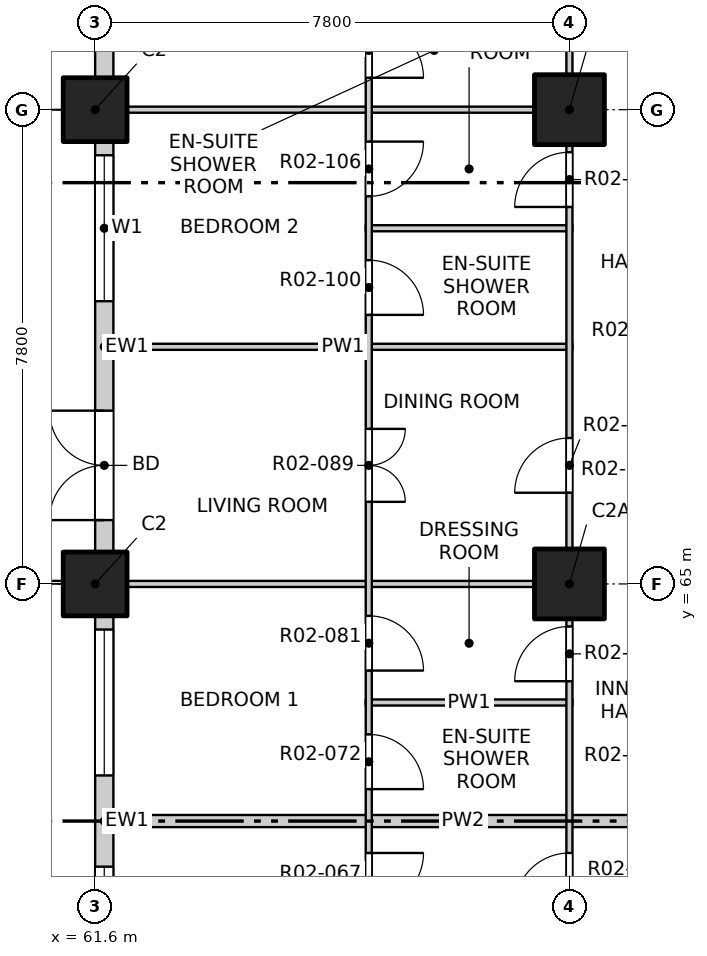
"""IFC4 building model, lengths in metres.
Left out: names, types, materials, properties, quantities, classifications, styles, units other than length and angle.
Written with IfcOpenShell. Run it as: python <this file> out.ifc"""

import sys

from ifc_helpers import new_model, si_unit, direction, frame, frame_2d, origin, origin_2d, place, context, subcontext, project, spatial, rectangle, extrude, element, fill, save


model = new_model("IFC4")
c1 = context("Model", 3, precision=1e-05, world=origin(), true_north=direction((0.0, 1.0)))
c2 = subcontext(c1, "Body", "Model", "MODEL_VIEW")
j1 = project(units=[si_unit("LENGTHUNIT", "METRE"), si_unit("PLANEANGLEUNIT", "RADIAN")], contexts=[c1])
p1 = place(None, origin())
s1 = spatial("IfcSite", under=j1, at=p1, CompositionType="ELEMENT")
p2 = place(p1, origin())
s2 = spatial("IfcBuilding", under=s1, at=p2, CompositionType="ELEMENT")
p3 = place(p2, frame((0.0, 0.0, 29.7)))
s3 = spatial("IfcBuildingStorey", under=s2, at=p3, CompositionType="ELEMENT", Elevation=29.7)
for number, where, z_axis, x_axis in (
    (1, (61.6, 65.0, -0.25), (0.0, 0.0, 1.0), (1.0, 0.0, 0.0)),
    (2, (61.6, 72.8, -0.25), (0.0, 0.0, 1.0), (1.0, 0.0, 0.0)),
):
    element("IfcColumn", number, at=place(p3, frame(where, z_axis=z_axis, x_axis=x_axis)), inside=s3, PredefinedType="COLUMN", context=c2, shape_type="SweptSolid", body=[
        extrude(rectangle(XDim=1.05, YDim=1.05, at=origin_2d()), origin(), (0.0, 0.0, 1.0), 3.4),
    ])
for number, where, z_axis, x_axis in (
    (3, (69.4, 65.0, -0.25), (0.0, 0.0, 1.0), (1.0, 0.0, 0.0)),
    (4, (69.4, 72.8, -0.25), (0.0, 0.0, 1.0), (1.0, 0.0, 0.0)),
):
    element("IfcColumn", number, at=place(p3, frame(where, z_axis=z_axis, x_axis=x_axis)), inside=s3, PredefinedType="COLUMN", context=c2, shape_type="SweptSolid", body=[
        extrude(rectangle(XDim=1.15, YDim=1.15, at=origin_2d()), origin(), (0.0, 0.0, 1.0), 3.4),
    ])
p4 = place(p3, frame((61.75, 57.725, 0.0), z_axis=(0.0, 0.0, 1.0), x_axis=(0.0, 1.0, 0.0)))
e5 = element("IfcWall", 5, at=p4, inside=s3, PredefinedType="SOLIDWALL", context=c2, shape_type="SweptSolid", body=[
    extrude(rectangle(XDim=6.75, YDim=0.3, at=frame_2d((3.375, 0.0))), origin(), (0.0, 0.0, 1.0), 2.7),
])
p5 = place(p4, frame((0.225, 0.0, 0.9)))
e6 = element("IfcOpeningElement", 6, at=p5, cuts=e5, PredefinedType="OPENING", context=c2, shape_type="SweptSolid", body=[
    extrude(rectangle(XDim=2.4, YDim=1.8, at=frame_2d((1.2, 0.9))), frame((0.0, 0.16, 0.0), z_axis=(0.0, -1.0, 0.0), x_axis=(1.0, 0.0, 0.0)), (0.0, 0.0, 1.0), 0.32),
])
p6 = place(p4, frame((4.125, 0.0, 0.9)))
e7 = element("IfcOpeningElement", 7, at=p6, cuts=e5, PredefinedType="OPENING", context=c2, shape_type="SweptSolid", body=[
    extrude(rectangle(XDim=2.4, YDim=1.8, at=frame_2d((1.2, 0.9))), frame((0.0, 0.16, 0.0), z_axis=(0.0, -1.0, 0.0), x_axis=(1.0, 0.0, 0.0)), (0.0, 0.0, 1.0), 0.32),
])
p7 = place(p3, frame((61.75, 65.525, 0.0), z_axis=(0.0, 0.0, 1.0), x_axis=(0.0, 1.0, 0.0)))
e8 = element("IfcWall", 8, at=p7, inside=s3, PredefinedType="SOLIDWALL", context=c2, shape_type="SweptSolid", body=[
    extrude(rectangle(XDim=6.75, YDim=0.3, at=frame_2d((3.375, 0.0))), origin(), (0.0, 0.0, 1.0), 2.7),
])
p8 = place(p7, frame((0.525, 0.0, 0.0)))
e9 = element("IfcOpeningElement", 9, at=p8, cuts=e8, PredefinedType="OPENING", context=c2, shape_type="SweptSolid", body=[
    extrude(rectangle(XDim=1.8, YDim=2.4, at=frame_2d((0.9, 1.2))), frame((0.0, 0.16, 0.0), z_axis=(0.0, -1.0, 0.0), x_axis=(1.0, 0.0, 0.0)), (0.0, 0.0, 1.0), 0.32),
])
p9 = place(p7, frame((4.125, 0.0, 0.9)))
e10 = element("IfcOpeningElement", 10, at=p9, cuts=e8, PredefinedType="OPENING", context=c2, shape_type="SweptSolid", body=[
    extrude(rectangle(XDim=2.4, YDim=1.8, at=frame_2d((1.2, 0.9))), frame((0.0, 0.16, 0.0), z_axis=(0.0, -1.0, 0.0), x_axis=(1.0, 0.0, 0.0)), (0.0, 0.0, 1.0), 0.32),
])
p10 = place(p3, frame((61.75, 73.325, 0.0), z_axis=(0.0, 0.0, 1.0), x_axis=(0.0, 1.0, 0.0)))
e11 = element("IfcWall", 11, at=p10, inside=s3, PredefinedType="SOLIDWALL", context=c2, shape_type="SweptSolid", body=[
    extrude(rectangle(XDim=6.75, YDim=0.3, at=frame_2d((3.375, 0.0))), origin(), (0.0, 0.0, 1.0), 2.7),
])
p11 = place(p10, frame((0.525, 0.0, 0.0)))
e12 = element("IfcOpeningElement", 12, at=p11, cuts=e11, PredefinedType="OPENING", context=c2, shape_type="SweptSolid", body=[
    extrude(rectangle(XDim=1.8, YDim=2.4, at=frame_2d((0.9, 1.2))), frame((0.0, 0.16, 0.0), z_axis=(0.0, -1.0, 0.0), x_axis=(1.0, 0.0, 0.0)), (0.0, 0.0, 1.0), 0.32),
])
p12 = place(p10, frame((4.125, 0.0, 0.9)))
e13 = element("IfcOpeningElement", 13, at=p12, cuts=e11, PredefinedType="OPENING", context=c2, shape_type="SweptSolid", body=[
    extrude(rectangle(XDim=2.4, YDim=1.8, at=frame_2d((1.2, 0.9))), frame((0.0, 0.16, 0.0), z_axis=(0.0, -1.0, 0.0), x_axis=(1.0, 0.0, 0.0)), (0.0, 0.0, 1.0), 0.32),
])
p13 = place(p3, frame((61.9, 61.1, 0.0), z_axis=(0.0, 0.0, 1.0), x_axis=(1.0, 0.0, 0.0)))
e14 = element("IfcWall", 14, at=p13, inside=s3, PredefinedType="PARTITIONING", context=c2, shape_type="SweptSolid", body=[
    extrude(rectangle(XDim=11.5, YDim=0.2, at=frame_2d((5.75, 0.0))), origin(), (0.0, 0.0, 1.0), 3.15),
])
p14 = place(p3, frame((66.05, 63.05, 0.0), z_axis=(0.0, 0.0, 1.0), x_axis=(1.0, 0.0, 0.0)))
e15 = element("IfcWall", 15, at=p14, inside=s3, PredefinedType="PARTITIONING", context=c2, shape_type="SweptSolid", body=[
    extrude(rectangle(XDim=3.4, YDim=0.1, at=frame_2d((1.7, 0.0))), origin(), (0.0, 0.0, 1.0), 3.15),
])
p15 = place(p3, frame((61.9, 65.0, 0.0), z_axis=(0.0, 0.0, 1.0), x_axis=(1.0, 0.0, 0.0)))
e16 = element("IfcWall", 16, at=p15, inside=s3, PredefinedType="PARTITIONING", context=c2, shape_type="SweptSolid", body=[
    extrude(rectangle(XDim=7.55, YDim=0.1, at=frame_2d((3.775, 0.0))), origin(), (0.0, 0.0, 1.0), 2.55),
])
p16 = place(p3, frame((61.9, 68.9, 0.0), z_axis=(0.0, 0.0, 1.0), x_axis=(1.0, 0.0, 0.0)))
e17 = element("IfcWall", 17, at=p16, inside=s3, PredefinedType="PARTITIONING", context=c2, shape_type="SweptSolid", body=[
    extrude(rectangle(XDim=7.55, YDim=0.1, at=frame_2d((3.775, 0.0))), origin(), (0.0, 0.0, 1.0), 3.15),
])
p17 = place(p3, frame((66.05, 70.85, 0.0), z_axis=(0.0, 0.0, 1.0), x_axis=(1.0, 0.0, 0.0)))
e18 = element("IfcWall", 18, at=p17, inside=s3, PredefinedType="PARTITIONING", context=c2, shape_type="SweptSolid", body=[
    extrude(rectangle(XDim=3.4, YDim=0.1, at=frame_2d((1.7, 0.0))), origin(), (0.0, 0.0, 1.0), 3.15),
])
p18 = place(p3, frame((61.9, 72.8, 0.0), z_axis=(0.0, 0.0, 1.0), x_axis=(1.0, 0.0, 0.0)))
e19 = element("IfcWall", 19, at=p18, inside=s3, PredefinedType="PARTITIONING", context=c2, shape_type="SweptSolid", body=[
    extrude(rectangle(XDim=7.55, YDim=0.1, at=frame_2d((3.775, 0.0))), origin(), (0.0, 0.0, 1.0), 2.55),
])
p19 = place(p3, frame((66.1, 41.9, 0.0), z_axis=(0.0, 0.0, 1.0), x_axis=(0.0, 1.0, 0.0)))
e20 = element("IfcWall", 20, at=p19, inside=s3, PredefinedType="PARTITIONING", context=c2, shape_type="SweptSolid", body=[
    extrude(rectangle(XDim=34.7, YDim=0.1, at=frame_2d((17.35, 0.0))), origin(), (0.0, 0.0, 1.0), 3.15),
])
p20 = place(p19, frame((1.05, 0.0, 0.0)))
e21 = element("IfcOpeningElement", 21, at=p20, cuts=e20, PredefinedType="OPENING", context=c2, shape_type="SweptSolid", body=[
    extrude(rectangle(XDim=1.2, YDim=2.1, at=frame_2d((0.6, 1.05))), frame((0.0, 0.06, 0.0), z_axis=(0.0, -1.0, 0.0), x_axis=(1.0, 0.0, 0.0)), (0.0, 0.0, 1.0), 0.12),
])
p21 = place(p19, frame((4.95, 0.0, 0.0)))
e22 = element("IfcOpeningElement", 22, at=p21, cuts=e20, PredefinedType="OPENING", context=c2, shape_type="SweptSolid", body=[
    extrude(rectangle(XDim=1.2, YDim=2.1, at=frame_2d((0.6, 1.05))), frame((0.0, 0.06, 0.0), z_axis=(0.0, -1.0, 0.0), x_axis=(1.0, 0.0, 0.0)), (0.0, 0.0, 1.0), 0.12),
])
p22 = place(p19, frame((8.025, 0.0, 0.0)))
e23 = element("IfcOpeningElement", 23, at=p22, cuts=e20, PredefinedType="OPENING", context=c2, shape_type="SweptSolid", body=[
    extrude(rectangle(XDim=0.9, YDim=2.1, at=frame_2d((0.45, 1.05))), frame((0.0, 0.06, 0.0), z_axis=(0.0, -1.0, 0.0), x_axis=(1.0, 0.0, 0.0)), (0.0, 0.0, 1.0), 0.12),
])
p23 = place(p19, frame((9.975, 0.0, 0.0)))
e24 = element("IfcOpeningElement", 24, at=p23, cuts=e20, PredefinedType="OPENING", context=c2, shape_type="SweptSolid", body=[
    extrude(rectangle(XDim=0.9, YDim=2.1, at=frame_2d((0.45, 1.05))), frame((0.0, 0.06, 0.0), z_axis=(0.0, -1.0, 0.0), x_axis=(1.0, 0.0, 0.0)), (0.0, 0.0, 1.0), 0.12),
])
p24 = place(p19, frame((12.75, 0.0, 0.0)))
e25 = element("IfcOpeningElement", 25, at=p24, cuts=e20, PredefinedType="OPENING", context=c2, shape_type="SweptSolid", body=[
    extrude(rectangle(XDim=1.2, YDim=2.1, at=frame_2d((0.6, 1.05))), frame((0.0, 0.06, 0.0), z_axis=(0.0, -1.0, 0.0), x_axis=(1.0, 0.0, 0.0)), (0.0, 0.0, 1.0), 0.12),
])
p25 = place(p19, frame((15.825, 0.0, 0.0)))
e26 = element("IfcOpeningElement", 26, at=p25, cuts=e20, PredefinedType="OPENING", context=c2, shape_type="SweptSolid", body=[
    extrude(rectangle(XDim=0.9, YDim=2.1, at=frame_2d((0.45, 1.05))), frame((0.0, 0.06, 0.0), z_axis=(0.0, -1.0, 0.0), x_axis=(1.0, 0.0, 0.0)), (0.0, 0.0, 1.0), 0.12),
])
p26 = place(p19, frame((17.775, 0.0, 0.0)))
e27 = element("IfcOpeningElement", 27, at=p26, cuts=e20, PredefinedType="OPENING", context=c2, shape_type="SweptSolid", body=[
    extrude(rectangle(XDim=0.9, YDim=2.1, at=frame_2d((0.45, 1.05))), frame((0.0, 0.06, 0.0), z_axis=(0.0, -1.0, 0.0), x_axis=(1.0, 0.0, 0.0)), (0.0, 0.0, 1.0), 0.12),
])
p27 = place(p19, frame((19.725, 0.0, 0.0)))
e28 = element("IfcOpeningElement", 28, at=p27, cuts=e20, PredefinedType="OPENING", context=c2, shape_type="SweptSolid", body=[
    extrude(rectangle(XDim=0.9, YDim=2.1, at=frame_2d((0.45, 1.05))), frame((0.0, 0.06, 0.0), z_axis=(0.0, -1.0, 0.0), x_axis=(1.0, 0.0, 0.0)), (0.0, 0.0, 1.0), 0.12),
])
p28 = place(p19, frame((21.675, 0.0, 0.0)))
e29 = element("IfcOpeningElement", 29, at=p28, cuts=e20, PredefinedType="OPENING", context=c2, shape_type="SweptSolid", body=[
    extrude(rectangle(XDim=0.9, YDim=2.1, at=frame_2d((0.45, 1.05))), frame((0.0, 0.06, 0.0), z_axis=(0.0, -1.0, 0.0), x_axis=(1.0, 0.0, 0.0)), (0.0, 0.0, 1.0), 0.12),
])
p29 = place(p19, frame((24.45, 0.0, 0.0)))
e30 = element("IfcOpeningElement", 30, at=p29, cuts=e20, PredefinedType="OPENING", context=c2, shape_type="SweptSolid", body=[
    extrude(rectangle(XDim=1.2, YDim=2.1, at=frame_2d((0.6, 1.05))), frame((0.0, 0.06, 0.0), z_axis=(0.0, -1.0, 0.0), x_axis=(1.0, 0.0, 0.0)), (0.0, 0.0, 1.0), 0.12),
])
p30 = place(p19, frame((27.525, 0.0, 0.0)))
e31 = element("IfcOpeningElement", 31, at=p30, cuts=e20, PredefinedType="OPENING", context=c2, shape_type="SweptSolid", body=[
    extrude(rectangle(XDim=0.9, YDim=2.1, at=frame_2d((0.45, 1.05))), frame((0.0, 0.06, 0.0), z_axis=(0.0, -1.0, 0.0), x_axis=(1.0, 0.0, 0.0)), (0.0, 0.0, 1.0), 0.12),
])
p31 = place(p19, frame((29.475, 0.0, 0.0)))
e32 = element("IfcOpeningElement", 32, at=p31, cuts=e20, PredefinedType="OPENING", context=c2, shape_type="SweptSolid", body=[
    extrude(rectangle(XDim=0.9, YDim=2.1, at=frame_2d((0.45, 1.05))), frame((0.0, 0.06, 0.0), z_axis=(0.0, -1.0, 0.0), x_axis=(1.0, 0.0, 0.0)), (0.0, 0.0, 1.0), 0.12),
])
p32 = place(p19, frame((31.425, 0.0, 0.0)))
e33 = element("IfcOpeningElement", 33, at=p32, cuts=e20, PredefinedType="OPENING", context=c2, shape_type="SweptSolid", body=[
    extrude(rectangle(XDim=0.9, YDim=2.1, at=frame_2d((0.45, 1.05))), frame((0.0, 0.06, 0.0), z_axis=(0.0, -1.0, 0.0), x_axis=(1.0, 0.0, 0.0)), (0.0, 0.0, 1.0), 0.12),
])
p33 = place(p19, frame((33.375, 0.0, 0.0)))
e34 = element("IfcOpeningElement", 34, at=p33, cuts=e20, PredefinedType="OPENING", context=c2, shape_type="SweptSolid", body=[
    extrude(rectangle(XDim=0.9, YDim=2.1, at=frame_2d((0.45, 1.05))), frame((0.0, 0.06, 0.0), z_axis=(0.0, -1.0, 0.0), x_axis=(1.0, 0.0, 0.0)), (0.0, 0.0, 1.0), 0.12),
])
p34 = place(p3, frame((69.4, 49.4, 0.0), z_axis=(0.0, 0.0, 1.0), x_axis=(0.0, 1.0, 0.0)))
e35 = element("IfcWall", 35, at=p34, inside=s3, PredefinedType="PARTITIONING", context=c2, shape_type="SweptSolid", body=[
    extrude(rectangle(XDim=31.2, YDim=0.1, at=frame_2d((15.6, 0.0))), origin(), (0.0, 0.0, 1.0), 3.15),
])
p35 = place(p34, frame((2.475, 0.0, 0.0)))
e36 = element("IfcOpeningElement", 36, at=p35, cuts=e35, PredefinedType="OPENING", context=c2, shape_type="SweptSolid", body=[
    extrude(rectangle(XDim=0.9, YDim=2.1, at=frame_2d((0.45, 1.05))), frame((0.0, 0.06, 0.0), z_axis=(0.0, -1.0, 0.0), x_axis=(1.0, 0.0, 0.0)), (0.0, 0.0, 1.0), 0.12),
])
p36 = place(p34, frame((5.4, 0.0, 0.0)))
e37 = element("IfcOpeningElement", 37, at=p36, cuts=e35, PredefinedType="OPENING", context=c2, shape_type="SweptSolid", body=[
    extrude(rectangle(XDim=0.9, YDim=2.1, at=frame_2d((0.45, 1.05))), frame((0.0, 0.06, 0.0), z_axis=(0.0, -1.0, 0.0), x_axis=(1.0, 0.0, 0.0)), (0.0, 0.0, 1.0), 0.12),
])
p37 = place(p34, frame((10.275, 0.0, 0.0)))
e38 = element("IfcOpeningElement", 38, at=p37, cuts=e35, PredefinedType="OPENING", context=c2, shape_type="SweptSolid", body=[
    extrude(rectangle(XDim=0.9, YDim=2.1, at=frame_2d((0.45, 1.05))), frame((0.0, 0.06, 0.0), z_axis=(0.0, -1.0, 0.0), x_axis=(1.0, 0.0, 0.0)), (0.0, 0.0, 1.0), 0.12),
])
p38 = place(p34, frame((14.0, 0.0, 0.0)))
e39 = element("IfcOpeningElement", 39, at=p38, cuts=e35, PredefinedType="OPENING", context=c2, shape_type="SweptSolid", body=[
    extrude(rectangle(XDim=0.9, YDim=2.1, at=frame_2d((0.45, 1.05))), frame((0.0, 0.06, 0.0), z_axis=(0.0, -1.0, 0.0), x_axis=(1.0, 0.0, 0.0)), (0.0, 0.0, 1.0), 0.12),
])
p39 = place(p34, frame((17.1, 0.0, 0.0)))
e40 = element("IfcOpeningElement", 40, at=p39, cuts=e35, PredefinedType="OPENING", context=c2, shape_type="SweptSolid", body=[
    extrude(rectangle(XDim=0.9, YDim=2.1, at=frame_2d((0.45, 1.05))), frame((0.0, 0.06, 0.0), z_axis=(0.0, -1.0, 0.0), x_axis=(1.0, 0.0, 0.0)), (0.0, 0.0, 1.0), 0.12),
])
p40 = place(p34, frame((21.8, 0.0, 0.0)))
e41 = element("IfcOpeningElement", 41, at=p40, cuts=e35, PredefinedType="OPENING", context=c2, shape_type="SweptSolid", body=[
    extrude(rectangle(XDim=0.9, YDim=2.1, at=frame_2d((0.45, 1.05))), frame((0.0, 0.06, 0.0), z_axis=(0.0, -1.0, 0.0), x_axis=(1.0, 0.0, 0.0)), (0.0, 0.0, 1.0), 0.12),
])
p41 = place(p34, frame((25.875, 0.0, 0.0)))
e42 = element("IfcOpeningElement", 42, at=p41, cuts=e35, PredefinedType="OPENING", context=c2, shape_type="SweptSolid", body=[
    extrude(rectangle(XDim=0.9, YDim=2.1, at=frame_2d((0.45, 1.05))), frame((0.0, 0.06, 0.0), z_axis=(0.0, -1.0, 0.0), x_axis=(1.0, 0.0, 0.0)), (0.0, 0.0, 1.0), 0.12),
])
p42 = place(p34, frame((29.6, 0.0, 0.0)))
e43 = element("IfcOpeningElement", 43, at=p42, cuts=e35, PredefinedType="OPENING", context=c2, shape_type="SweptSolid", body=[
    extrude(rectangle(XDim=0.9, YDim=2.1, at=frame_2d((0.45, 1.05))), frame((0.0, 0.06, 0.0), z_axis=(0.0, -1.0, 0.0), x_axis=(1.0, 0.0, 0.0)), (0.0, 0.0, 1.0), 0.12),
])
p43 = place(p5, origin())
e44 = element("IfcWindow", 44, at=p43, inside=s3, PartitioningType="DOUBLE_PANEL_VERTICAL", PredefinedType="WINDOW", context=c2, shape_type="SweptSolid", body=[
    extrude(rectangle(XDim=2.4, YDim=1.8, at=frame_2d((1.2, 0.9))), frame((0.0, 0.03, 0.0), z_axis=(0.0, -1.0, 0.0), x_axis=(1.0, 0.0, 0.0)), (0.0, 0.0, 1.0), 0.06),
])
fill(e6, e44)
p44 = place(p6, origin())
e45 = element("IfcWindow", 45, at=p44, inside=s3, PartitioningType="DOUBLE_PANEL_VERTICAL", PredefinedType="WINDOW", context=c2, shape_type="SweptSolid", body=[
    extrude(rectangle(XDim=2.4, YDim=1.8, at=frame_2d((1.2, 0.9))), frame((0.0, 0.03, 0.0), z_axis=(0.0, -1.0, 0.0), x_axis=(1.0, 0.0, 0.0)), (0.0, 0.0, 1.0), 0.06),
])
fill(e7, e45)
p45 = place(p8, origin())
e46 = element("IfcDoor", 46, at=p45, inside=s3, OperationType="DOUBLE_DOOR_SINGLE_SWING", PredefinedType="DOOR", context=c2, shape_type="SweptSolid", body=[
    extrude(rectangle(XDim=1.8, YDim=2.4, at=frame_2d((0.9, 1.2))), frame((0.0, 0.025, 0.0), z_axis=(0.0, -1.0, 0.0), x_axis=(1.0, 0.0, 0.0)), (0.0, 0.0, 1.0), 0.05),
])
fill(e9, e46)
p46 = place(p9, origin())
e47 = element("IfcWindow", 47, at=p46, inside=s3, PartitioningType="DOUBLE_PANEL_VERTICAL", PredefinedType="WINDOW", context=c2, shape_type="SweptSolid", body=[
    extrude(rectangle(XDim=2.4, YDim=1.8, at=frame_2d((1.2, 0.9))), frame((0.0, 0.03, 0.0), z_axis=(0.0, -1.0, 0.0), x_axis=(1.0, 0.0, 0.0)), (0.0, 0.0, 1.0), 0.06),
])
fill(e10, e47)
p47 = place(p26, origin())
e48 = element("IfcDoor", 48, at=p47, inside=s3, OperationType="SINGLE_SWING_LEFT", PredefinedType="DOOR", context=c2, shape_type="SweptSolid", body=[
    extrude(rectangle(XDim=0.9, YDim=2.1, at=frame_2d((0.45, 1.05))), frame((0.0, 0.025, 0.0), z_axis=(0.0, -1.0, 0.0), x_axis=(1.0, 0.0, 0.0)), (0.0, 0.0, 1.0), 0.05),
])
fill(e27, e48)
p48 = place(p37, origin())
e49 = element("IfcDoor", 49, at=p48, inside=s3, OperationType="SINGLE_SWING_LEFT", PredefinedType="DOOR", context=c2, shape_type="SweptSolid", body=[
    extrude(rectangle(XDim=0.9, YDim=2.1, at=frame_2d((0.45, 1.05))), frame((0.0, 0.025, 0.0), z_axis=(0.0, -1.0, 0.0), x_axis=(1.0, 0.0, 0.0)), (0.0, 0.0, 1.0), 0.05),
])
fill(e38, e49)
p49 = place(p27, origin())
e50 = element("IfcDoor", 50, at=p49, inside=s3, OperationType="SINGLE_SWING_RIGHT", PredefinedType="DOOR", context=c2, shape_type="SweptSolid", body=[
    extrude(rectangle(XDim=0.9, YDim=2.1, at=frame_2d((0.45, 1.05))), frame((0.0, 0.025, 0.0), z_axis=(0.0, -1.0, 0.0), x_axis=(1.0, 0.0, 0.0)), (0.0, 0.0, 1.0), 0.05),
])
fill(e28, e50)
p50 = place(p38, origin())
e51 = element("IfcDoor", 51, at=p50, inside=s3, OperationType="SINGLE_SWING_LEFT", PredefinedType="DOOR", context=c2, shape_type="SweptSolid", body=[
    extrude(rectangle(XDim=0.9, YDim=2.1, at=frame_2d((0.45, 1.05))), frame((0.0, 0.025, 0.0), z_axis=(0.0, -1.0, 0.0), x_axis=(1.0, 0.0, 0.0)), (0.0, 0.0, 1.0), 0.05),
])
fill(e39, e51)
p51 = place(p28, origin())
e52 = element("IfcDoor", 52, at=p51, inside=s3, OperationType="SINGLE_SWING_RIGHT", PredefinedType="DOOR", context=c2, shape_type="SweptSolid", body=[
    extrude(rectangle(XDim=0.9, YDim=2.1, at=frame_2d((0.45, 1.05))), frame((0.0, 0.025, 0.0), z_axis=(0.0, -1.0, 0.0), x_axis=(1.0, 0.0, 0.0)), (0.0, 0.0, 1.0), 0.05),
])
fill(e29, e52)
p52 = place(p29, origin())
e53 = element("IfcDoor", 53, at=p52, inside=s3, OperationType="DOUBLE_DOOR_SINGLE_SWING", PredefinedType="DOOR", context=c2, shape_type="SweptSolid", body=[
    extrude(rectangle(XDim=1.2, YDim=2.1, at=frame_2d((0.6, 1.05))), frame((0.0, 0.025, 0.0), z_axis=(0.0, -1.0, 0.0), x_axis=(1.0, 0.0, 0.0)), (0.0, 0.0, 1.0), 0.05),
])
fill(e30, e53)
p53 = place(p39, origin())
e54 = element("IfcDoor", 54, at=p53, inside=s3, OperationType="SINGLE_SWING_LEFT", PredefinedType="DOOR", context=c2, shape_type="SweptSolid", body=[
    extrude(rectangle(XDim=0.9, YDim=2.1, at=frame_2d((0.45, 1.05))), frame((0.0, 0.025, 0.0), z_axis=(0.0, -1.0, 0.0), x_axis=(1.0, 0.0, 0.0)), (0.0, 0.0, 1.0), 0.05),
])
fill(e40, e54)
p54 = place(p30, origin())
e55 = element("IfcDoor", 55, at=p54, inside=s3, OperationType="SINGLE_SWING_RIGHT", PredefinedType="DOOR", context=c2, shape_type="SweptSolid", body=[
    extrude(rectangle(XDim=0.9, YDim=2.1, at=frame_2d((0.45, 1.05))), frame((0.0, 0.025, 0.0), z_axis=(0.0, -1.0, 0.0), x_axis=(1.0, 0.0, 0.0)), (0.0, 0.0, 1.0), 0.05),
])
fill(e31, e55)
p55 = place(p40, origin())
e56 = element("IfcDoor", 56, at=p55, inside=s3, OperationType="SINGLE_SWING_LEFT", PredefinedType="DOOR", context=c2, shape_type="SweptSolid", body=[
    extrude(rectangle(XDim=0.9, YDim=2.1, at=frame_2d((0.45, 1.05))), frame((0.0, 0.025, 0.0), z_axis=(0.0, -1.0, 0.0), x_axis=(1.0, 0.0, 0.0)), (0.0, 0.0, 1.0), 0.05),
])
fill(e41, e56)
p56 = place(p31, origin())
e57 = element("IfcDoor", 57, at=p56, inside=s3, OperationType="SINGLE_SWING_LEFT", PredefinedType="DOOR", context=c2, shape_type="SweptSolid", body=[
    extrude(rectangle(XDim=0.9, YDim=2.1, at=frame_2d((0.45, 1.05))), frame((0.0, 0.025, 0.0), z_axis=(0.0, -1.0, 0.0), x_axis=(1.0, 0.0, 0.0)), (0.0, 0.0, 1.0), 0.05),
])
fill(e32, e57)
p57 = place(p32, origin())
e58 = element("IfcDoor", 58, at=p57, inside=s3, OperationType="SINGLE_SWING_RIGHT", PredefinedType="DOOR", context=c2, shape_type="SweptSolid", body=[
    extrude(rectangle(XDim=0.9, YDim=2.1, at=frame_2d((0.45, 1.05))), frame((0.0, 0.025, 0.0), z_axis=(0.0, -1.0, 0.0), x_axis=(1.0, 0.0, 0.0)), (0.0, 0.0, 1.0), 0.05),
])
fill(e33, e58)
save(model, sys.argv[1])
